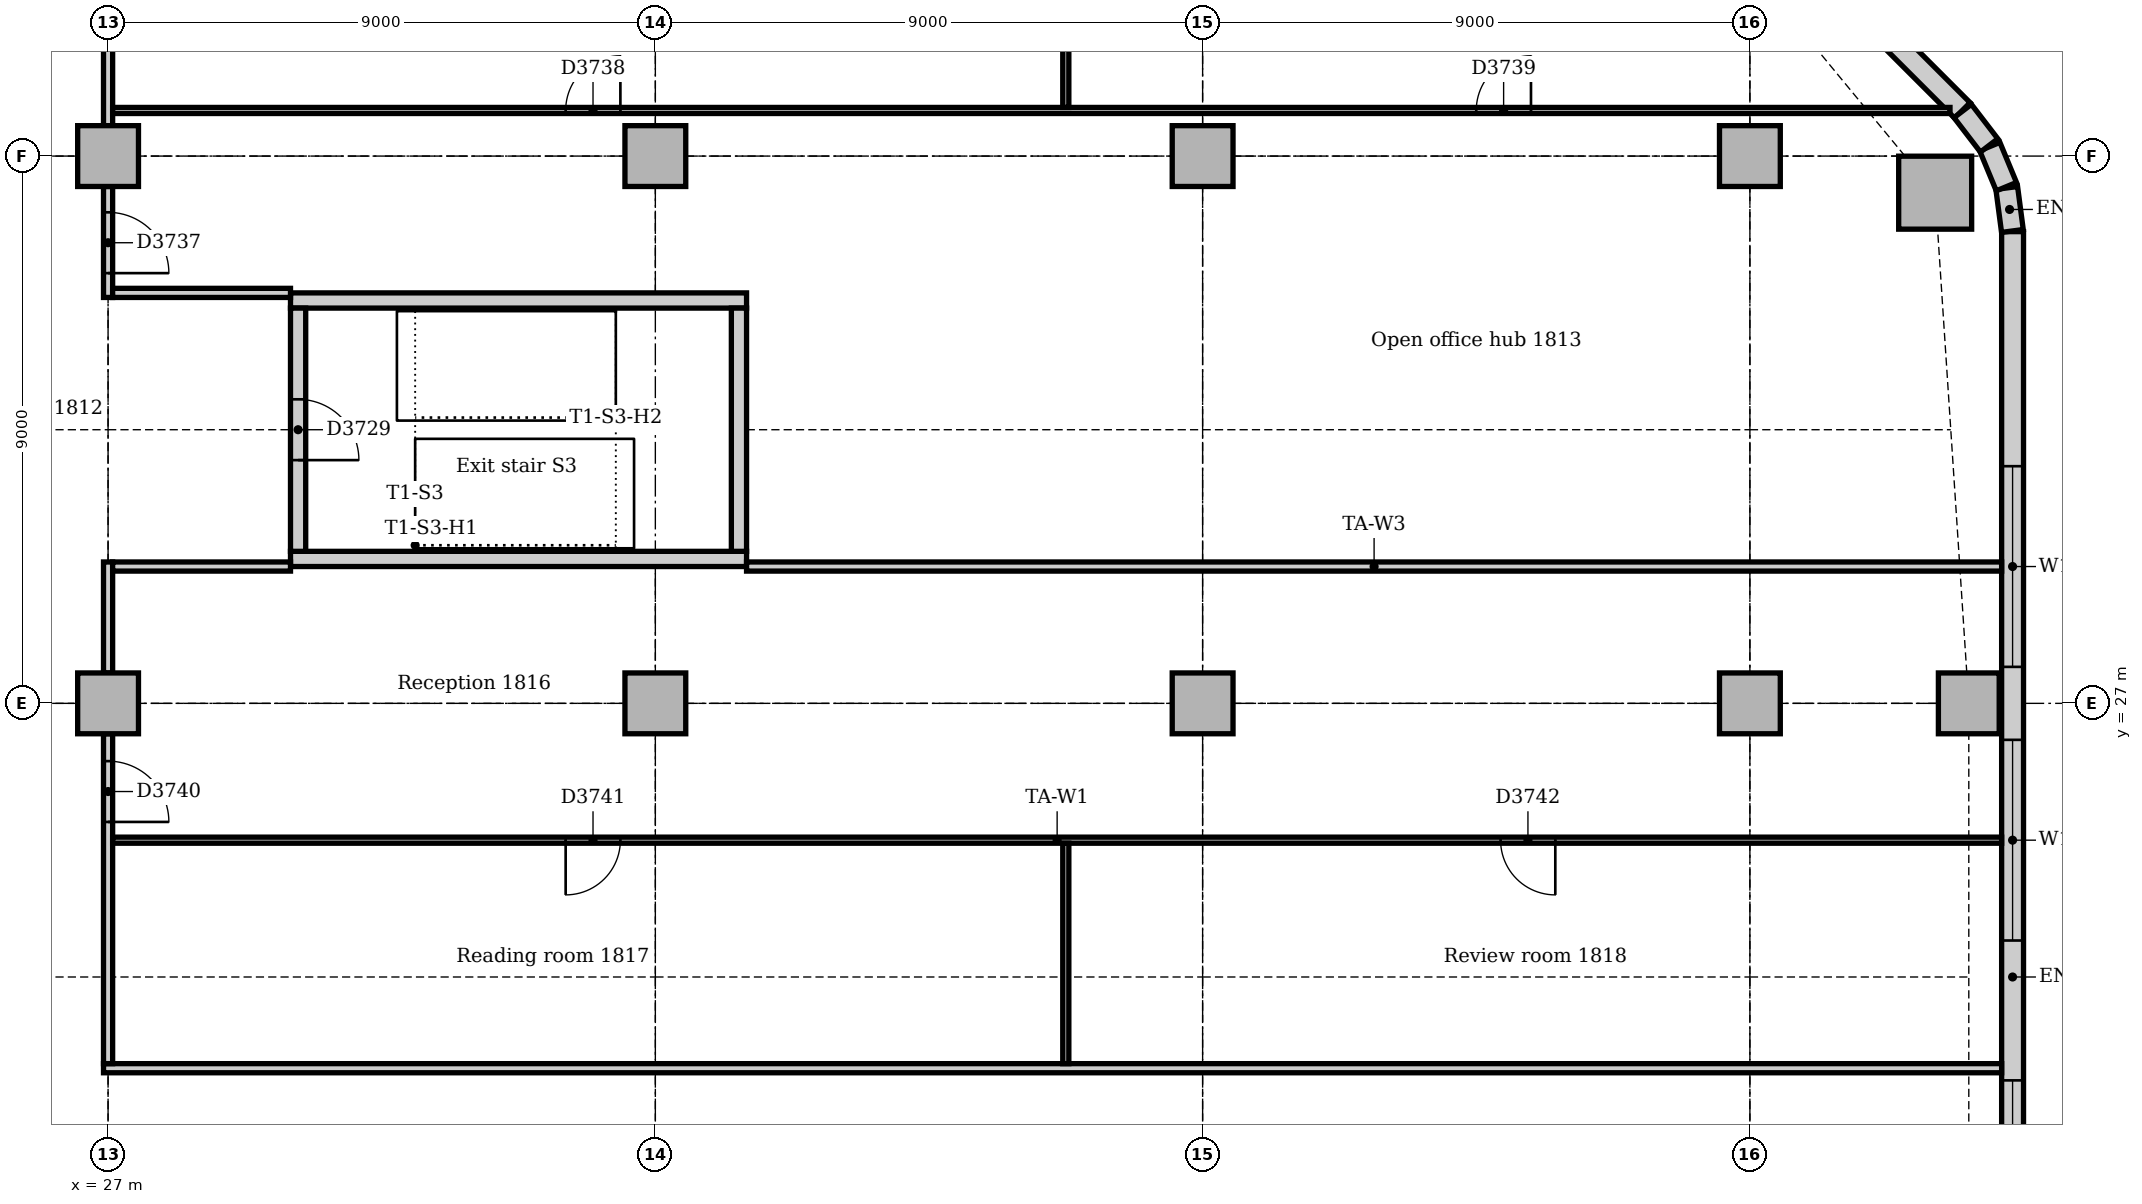
"""IFC4 building model, lengths in metres.
Left out: names, types, materials, properties, quantities, classifications, styles, units other than length and angle.
Written with IfcOpenShell. Run it as: python <this file> out.ifc"""

import sys

from ifc_helpers import new_model, si_unit, direction, frame, frame_2d, origin, origin_2d, place, context, subcontext, project, spatial, rectangle, extrude, element, fill, save


model = new_model("IFC4")
c1 = context("Model", 3, precision=1e-05, world=origin(), true_north=direction((0.0, 1.0)))
c2 = subcontext(c1, "Body", "Model", "MODEL_VIEW")
j1 = project(units=[si_unit("LENGTHUNIT", "METRE"), si_unit("PLANEANGLEUNIT", "RADIAN")], contexts=[c1])
p1 = place(None, origin())
s1 = spatial("IfcSite", under=j1, at=p1, CompositionType="ELEMENT")
p2 = place(p1, origin())
s2 = spatial("IfcBuilding", under=s1, at=p2, CompositionType="ELEMENT")
p3 = place(p2, frame((0.0, 0.0, 79.0)))
s3 = spatial("IfcBuildingStorey", under=s2, at=p3, CompositionType="ELEMENT", Elevation=79.0)
for number, where, z_axis, x_axis in (
    (1, (30.0, 29.375, 0.0), (0.0, 0.0, 1.0), (1.0, 0.0, 0.0)),
    (2, (37.5, 33.625, 0.0), (0.0, 0.0, 1.0), (-1.0, 0.0, 0.0)),
):
    element("IfcWall", number, at=place(p3, frame(where, z_axis=z_axis, x_axis=x_axis)), inside=s3, PredefinedType="SOLIDWALL", context=c2, shape_type="SweptSolid", body=[
        extrude(rectangle(XDim=7.5, YDim=0.25, at=frame_2d((3.75, 0.0))), origin(), (0.0, 0.0, 1.0), 4.0),
    ])
p4 = place(p3, frame((37.375, 29.5, 0.0), z_axis=(0.0, 0.0, 1.0), x_axis=(0.0, 1.0, 0.0)))
e3 = element("IfcWall", 3, at=p4, inside=s3, PredefinedType="SOLIDWALL", context=c2, shape_type="SweptSolid", body=[
    extrude(rectangle(XDim=4.0, YDim=0.25, at=frame_2d((2.0, 0.0))), origin(), (0.0, 0.0, 1.0), 4.0),
])
p5 = place(p3, frame((30.125, 33.5, 0.0), z_axis=(0.0, 0.0, 1.0), x_axis=(0.0, -1.0, 0.0)))
e4 = element("IfcWall", 4, at=p5, inside=s3, PredefinedType="SOLIDWALL", context=c2, shape_type="SweptSolid", body=[
    extrude(rectangle(XDim=4.0, YDim=0.25, at=frame_2d((2.0, 0.0))), origin(), (0.0, 0.0, 1.0), 4.0),
])
p6 = place(p5, frame((1.5, 0.0, 0.0)))
e5 = element("IfcOpeningElement", 5, at=p6, cuts=e4, PredefinedType="OPENING", context=c2, shape_type="SweptSolid", body=[
    extrude(rectangle(XDim=1.0, YDim=2.1, at=frame_2d((0.5, 1.05))), frame((0.0, 0.135, 0.0), z_axis=(0.0, -1.0, 0.0), x_axis=(1.0, 0.0, 0.0)), (0.0, 0.0, 1.0), 0.27),
])
p7 = place(p3, frame((57.047, 35.398, 0.0), z_axis=(0.0, 0.0, 1.0), x_axis=(1.0, 0.0, 0.0)))
e6 = element("IfcColumn", 6, at=p7, inside=s3, PredefinedType="COLUMN", context=c2, shape_type="SweptSolid", body=[
    extrude(rectangle(XDim=1.2, YDim=1.2, at=origin_2d()), origin(), (0.0, 0.0, 1.0), 3.85),
])
for number, where, z_axis, x_axis in (
    (7, (57.6, 27.0, 0.0), (0.0, 0.0, 1.0), (1.0, 0.0, 0.0)),
    (8, (27.0, 27.0, 0.0), (0.0, 0.0, 1.0), (1.0, 0.0, 0.0)),
    (9, (27.0, 36.0, 0.0), (0.0, 0.0, 1.0), (1.0, 0.0, 0.0)),
    (10, (36.0, 27.0, 0.0), (0.0, 0.0, 1.0), (1.0, 0.0, 0.0)),
    (11, (36.0, 36.0, 0.0), (0.0, 0.0, 1.0), (1.0, 0.0, 0.0)),
    (12, (45.0, 27.0, 0.0), (0.0, 0.0, 1.0), (1.0, 0.0, 0.0)),
    (13, (45.0, 36.0, 0.0), (0.0, 0.0, 1.0), (1.0, 0.0, 0.0)),
    (14, (54.0, 27.0, 0.0), (0.0, 0.0, 1.0), (1.0, 0.0, 0.0)),
    (15, (54.0, 36.0, 0.0), (0.0, 0.0, 1.0), (1.0, 0.0, 0.0)),
):
    element("IfcColumn", number, at=place(p3, frame(where, z_axis=z_axis, x_axis=x_axis)), inside=s3, PredefinedType="COLUMN", context=c2, shape_type="SweptSolid", body=[
        extrude(rectangle(XDim=1.0, YDim=1.0, at=origin_2d()), origin(), (0.0, 0.0, 1.0), 3.85),
    ])
p8 = place(p3, frame((58.32, 10.243, 0.0), z_axis=(0.0, 0.0, 1.0), x_axis=(0.0, 1.0, 0.0)))
e16 = element("IfcWall", 16, at=p8, inside=s3, PredefinedType="STANDARD", context=c2, shape_type="SweptSolid", body=[
    extrude(rectangle(XDim=24.515, YDim=0.36, at=frame_2d((12.257, 0.0))), origin(), (0.0, 0.0, 1.0), 3.85),
])
p9 = place(p8, frame((4.907, 0.0, 0.9)))
e17 = element("IfcOpeningElement", 17, at=p9, cuts=e16, PredefinedType="OPENING", context=c2, shape_type="SweptSolid", body=[
    extrude(rectangle(XDim=1.8, YDim=1.6, at=frame_2d((0.9, 0.8))), frame((0.0, 0.19, 0.0), z_axis=(0.0, -1.0, 0.0), x_axis=(1.0, 0.0, 0.0)), (0.0, 0.0, 1.0), 0.38),
])
p10 = place(p8, frame((8.757, 0.0, 0.9)))
e18 = element("IfcOpeningElement", 18, at=p10, cuts=e16, PredefinedType="OPENING", context=c2, shape_type="SweptSolid", body=[
    extrude(rectangle(XDim=1.8, YDim=1.6, at=frame_2d((0.9, 0.8))), frame((0.0, 0.19, 0.0), z_axis=(0.0, -1.0, 0.0), x_axis=(1.0, 0.0, 0.0)), (0.0, 0.0, 1.0), 0.38),
])
p11 = place(p8, frame((12.857, 0.0, 0.9)))
e19 = element("IfcOpeningElement", 19, at=p11, cuts=e16, PredefinedType="OPENING", context=c2, shape_type="SweptSolid", body=[
    extrude(rectangle(XDim=3.3, YDim=1.6, at=frame_2d((1.65, 0.8))), frame((0.0, 0.19, 0.0), z_axis=(0.0, -1.0, 0.0), x_axis=(1.0, 0.0, 0.0)), (0.0, 0.0, 1.0), 0.38),
])
p12 = place(p8, frame((17.357, 0.0, 0.9)))
e20 = element("IfcOpeningElement", 20, at=p12, cuts=e16, PredefinedType="OPENING", context=c2, shape_type="SweptSolid", body=[
    extrude(rectangle(XDim=3.3, YDim=1.6, at=frame_2d((1.65, 0.8))), frame((0.0, 0.19, 0.0), z_axis=(0.0, -1.0, 0.0), x_axis=(1.0, 0.0, 0.0)), (0.0, 0.0, 1.0), 0.38),
])
p13 = place(p3, frame((57.494, 36.751, 0.0), z_axis=(0.0, 0.0, 1.0), x_axis=(-0.707106781187, 0.707106781187, 0.0)))
e21 = element("IfcWall", 21, at=p13, inside=s3, PredefinedType="STANDARD", context=c2, shape_type="SweptSolid", body=[
    extrude(rectangle(XDim=10.243, YDim=0.36, at=frame_2d((5.121, 0.0))), origin(), (0.0, 0.0, 1.0), 3.85),
])
p14 = place(p13, frame((3.471, 0.0, 0.9)))
e22 = element("IfcOpeningElement", 22, at=p14, cuts=e21, PredefinedType="OPENING", context=c2, shape_type="SweptSolid", body=[
    extrude(rectangle(XDim=3.3, YDim=1.6, at=frame_2d((1.65, 0.8))), frame((0.0, 0.19, 0.0), z_axis=(0.0, -1.0, 0.0), x_axis=(1.0, 0.0, 0.0)), (0.0, 0.0, 1.0), 0.38),
])
for number, where, z_axis, x_axis in (
    (23, (58.317, 34.769, 0.0), (0.0, 0.0, 1.0), (-0.131, 0.991, 0.0)),
    (24, (58.218, 35.497, 0.0), (0.0, 0.0, 1.0), (-0.383, 0.924, 0.0)),
):
    element("IfcWall", number, at=place(p3, frame(where, z_axis=z_axis, x_axis=x_axis)), inside=s3, PredefinedType="STANDARD", context=c2, shape_type="SweptSolid", body=[
        extrude(rectangle(XDim=0.713, YDim=0.36, at=frame_2d((0.356, 0.0))), origin(), (0.0, 0.0, 1.0), 3.85),
    ])
p15 = place(p3, frame((57.934, 36.175, 0.0), z_axis=(0.0, 0.0, 1.0), x_axis=(-0.608802368033, 0.793321924995, 0.0)))
e25 = element("IfcWall", 25, at=p15, inside=s3, PredefinedType="STANDARD", context=c2, shape_type="SweptSolid", body=[
    extrude(rectangle(XDim=0.713, YDim=0.36, at=frame_2d((0.357, 0.0))), origin(), (0.0, 0.0, 1.0), 3.85),
])
p16 = place(p3, frame((26.925, 21.0, 0.0), z_axis=(0.0, 0.0, 1.0), x_axis=(1.0, 0.0, 0.0)))
e26 = element("IfcWall", 26, at=p16, inside=s3, PredefinedType="PARTITIONING", context=c2, shape_type="SweptSolid", body=[
    extrude(rectangle(XDim=31.215, YDim=0.15, at=frame_2d((15.607, 0.0))), origin(), (0.0, 0.0, 1.0), 3.85),
])
p17 = place(p3, frame((27.0, 33.675, 0.0), z_axis=(0.0, 0.0, 1.0), x_axis=(0.0, 1.0, 0.0)))
e27 = element("IfcWall", 27, at=p17, inside=s3, PredefinedType="PARTITIONING", context=c2, shape_type="SweptSolid", body=[
    extrude(rectangle(XDim=1.825, YDim=0.15, at=frame_2d((0.912, 0.0))), origin(), (0.0, 0.0, 1.0), 3.158),
])
p18 = place(p17, frame((0.4, 0.0, 0.0)))
e28 = element("IfcOpeningElement", 28, at=p18, cuts=e27, PredefinedType="OPENING", context=c2, shape_type="SweptSolid", body=[
    extrude(rectangle(XDim=1.0, YDim=2.1, at=frame_2d((0.5, 1.05))), frame((0.0, 0.085, 0.0), z_axis=(0.0, -1.0, 0.0), x_axis=(1.0, 0.0, 0.0)), (0.0, 0.0, 1.0), 0.17),
])
p19 = place(p3, frame((27.0, 36.5, 0.0), z_axis=(0.0, 0.0, 1.0), x_axis=(0.0, 1.0, 0.0)))
e29 = element("IfcWall", 29, at=p19, inside=s3, PredefinedType="PARTITIONING", context=c2, shape_type="SweptSolid", body=[
    extrude(rectangle(XDim=7.1, YDim=0.15, at=frame_2d((3.55, 0.0))), origin(), (0.0, 0.0, 1.0), 3.158),
])
p20 = place(p3, frame((27.0, 21.075, 0.0), z_axis=(0.0, 0.0, 1.0), x_axis=(0.0, 1.0, 0.0)))
e30 = element("IfcWall", 30, at=p20, inside=s3, PredefinedType="PARTITIONING", context=c2, shape_type="SweptSolid", body=[
    extrude(rectangle(XDim=5.425, YDim=0.15, at=frame_2d((2.712, 0.0))), origin(), (0.0, 0.0, 1.0), 3.158),
])
p21 = place(p20, frame((3.975, 0.0, 0.0)))
e31 = element("IfcOpeningElement", 31, at=p21, cuts=e30, PredefinedType="OPENING", context=c2, shape_type="SweptSolid", body=[
    extrude(rectangle(XDim=1.0, YDim=2.1, at=frame_2d((0.5, 1.05))), frame((0.0, 0.085, 0.0), z_axis=(0.0, -1.0, 0.0), x_axis=(1.0, 0.0, 0.0)), (0.0, 0.0, 1.0), 0.17),
])
p22 = place(p3, frame((27.0, 27.5, 0.0), z_axis=(0.0, 0.0, 1.0), x_axis=(0.0, 1.0, 0.0)))
e32 = element("IfcWall", 32, at=p22, inside=s3, PredefinedType="PARTITIONING", context=c2, shape_type="SweptSolid", body=[
    extrude(rectangle(XDim=1.825, YDim=0.15, at=frame_2d((0.912, 0.0))), origin(), (0.0, 0.0, 1.0), 3.158),
])
for number, where, z_axis, x_axis in (
    (33, (27.075, 29.25, 0.0), (0.0, 0.0, 1.0), (1.0, 0.0, 0.0)),
    (34, (27.075, 33.75, 0.0), (0.0, 0.0, 1.0), (1.0, 0.0, 0.0)),
):
    element("IfcWall", number, at=place(p3, frame(where, z_axis=z_axis, x_axis=x_axis)), inside=s3, PredefinedType="PARTITIONING", context=c2, shape_type="SweptSolid", body=[
        extrude(rectangle(XDim=2.925, YDim=0.15, at=frame_2d((1.462, 0.0))), origin(), (0.0, 0.0, 1.0), 3.85),
    ])
p23 = place(p3, frame((37.5, 29.25, 0.0), z_axis=(0.0, 0.0, 1.0), x_axis=(1.0, 0.0, 0.0)))
e35 = element("IfcWall", 35, at=p23, inside=s3, PredefinedType="PARTITIONING", context=c2, shape_type="SweptSolid", body=[
    extrude(rectangle(XDim=20.64, YDim=0.15, at=frame_2d((10.32, 0.0))), origin(), (0.0, 0.0, 1.0), 3.85),
])
p24 = place(p3, frame((27.075, 24.75, 0.0), z_axis=(0.0, 0.0, 1.0), x_axis=(1.0, 0.0, 0.0)))
e36 = element("IfcWall", 36, at=p24, inside=s3, PredefinedType="PARTITIONING", context=c2, shape_type="SweptSolid", body=[
    extrude(rectangle(XDim=31.065, YDim=0.1, at=frame_2d((15.533, 0.0))), origin(), (0.0, 0.0, 1.0), 3.85),
])
p25 = place(p24, frame((7.45, 0.0, 0.0)))
e37 = element("IfcOpeningElement", 37, at=p25, cuts=e36, PredefinedType="OPENING", context=c2, shape_type="SweptSolid", body=[
    extrude(rectangle(XDim=0.9, YDim=2.1, at=frame_2d((0.45, 1.05))), frame((0.0, 0.06, 0.0), z_axis=(0.0, -1.0, 0.0), x_axis=(1.0, 0.0, 0.0)), (0.0, 0.0, 1.0), 0.12),
])
p26 = place(p24, frame((22.825, 0.0, 0.0)))
e38 = element("IfcOpeningElement", 38, at=p26, cuts=e36, PredefinedType="OPENING", context=c2, shape_type="SweptSolid", body=[
    extrude(rectangle(XDim=0.9, YDim=2.1, at=frame_2d((0.45, 1.05))), frame((0.0, 0.06, 0.0), z_axis=(0.0, -1.0, 0.0), x_axis=(1.0, 0.0, 0.0)), (0.0, 0.0, 1.0), 0.12),
])
p27 = place(p3, frame((27.075, 36.75, 0.0), z_axis=(0.0, 0.0, 1.0), x_axis=(1.0, 0.0, 0.0)))
e39 = element("IfcWall", 39, at=p27, inside=s3, PredefinedType="PARTITIONING", context=c2, shape_type="SweptSolid", body=[
    extrude(rectangle(XDim=30.216, YDim=0.1, at=frame_2d((15.108, 0.0))), origin(), (0.0, 0.0, 1.0), 3.85),
])
p28 = place(p27, frame((7.45, 0.0, 0.0)))
e40 = element("IfcOpeningElement", 40, at=p28, cuts=e39, PredefinedType="OPENING", context=c2, shape_type="SweptSolid", body=[
    extrude(rectangle(XDim=0.9, YDim=2.1, at=frame_2d((0.45, 1.05))), frame((0.0, 0.06, 0.0), z_axis=(0.0, -1.0, 0.0), x_axis=(1.0, 0.0, 0.0)), (0.0, 0.0, 1.0), 0.12),
])
p29 = place(p27, frame((22.425, 0.0, 0.0)))
e41 = element("IfcOpeningElement", 41, at=p29, cuts=e39, PredefinedType="OPENING", context=c2, shape_type="SweptSolid", body=[
    extrude(rectangle(XDim=0.9, YDim=2.1, at=frame_2d((0.45, 1.05))), frame((0.0, 0.06, 0.0), z_axis=(0.0, -1.0, 0.0), x_axis=(1.0, 0.0, 0.0)), (0.0, 0.0, 1.0), 0.12),
])
p30 = place(p3, frame((42.75, 36.8, 0.0), z_axis=(0.0, 0.0, 1.0), x_axis=(0.0, 1.0, 0.0)))
e42 = element("IfcWall", 42, at=p30, inside=s3, PredefinedType="PARTITIONING", context=c2, shape_type="SweptSolid", body=[
    extrude(rectangle(XDim=7.84, YDim=0.1, at=frame_2d((3.92, 0.0))), origin(), (0.0, 0.0, 1.0), 3.85),
])
p31 = place(p3, frame((42.75, 21.075, 0.0), z_axis=(0.0, 0.0, 1.0), x_axis=(0.0, 1.0, 0.0)))
e43 = element("IfcWall", 43, at=p31, inside=s3, PredefinedType="PARTITIONING", context=c2, shape_type="SweptSolid", body=[
    extrude(rectangle(XDim=3.625, YDim=0.1, at=frame_2d((1.812, 0.0))), origin(), (0.0, 0.0, 1.0), 3.85),
])
p32 = place(p10, origin())
e44 = element("IfcWindow", 44, at=p32, inside=s3, PartitioningType="SINGLE_PANEL", PredefinedType="WINDOW", context=c2, shape_type="SweptSolid", body=[
    extrude(rectangle(XDim=1.8, YDim=1.6, at=frame_2d((0.9, 0.8))), frame((0.0, 0.13, 0.0), z_axis=(0.0, -1.0, 0.0), x_axis=(1.0, 0.0, 0.0)), (0.0, 0.0, 1.0), 0.06),
])
fill(e18, e44)
p33 = place(p11, origin())
e45 = element("IfcWindow", 45, at=p33, inside=s3, PartitioningType="SINGLE_PANEL", PredefinedType="WINDOW", context=c2, shape_type="SweptSolid", body=[
    extrude(rectangle(XDim=3.3, YDim=1.6, at=frame_2d((1.65, 0.8))), frame((0.0, 0.13, 0.0), z_axis=(0.0, -1.0, 0.0), x_axis=(1.0, 0.0, 0.0)), (0.0, 0.0, 1.0), 0.06),
])
fill(e19, e45)
p34 = place(p12, origin())
e46 = element("IfcWindow", 46, at=p34, inside=s3, PartitioningType="SINGLE_PANEL", PredefinedType="WINDOW", context=c2, shape_type="SweptSolid", body=[
    extrude(rectangle(XDim=3.3, YDim=1.6, at=frame_2d((1.65, 0.8))), frame((0.0, 0.13, 0.0), z_axis=(0.0, -1.0, 0.0), x_axis=(1.0, 0.0, 0.0)), (0.0, 0.0, 1.0), 0.06),
])
fill(e20, e46)
p35 = place(p6, origin())
e47 = element("IfcDoor", 47, at=p35, inside=s3, OperationType="SINGLE_SWING_RIGHT", PredefinedType="DOOR", context=c2, shape_type="SweptSolid", body=[
    extrude(rectangle(XDim=1.0, YDim=2.1, at=frame_2d((0.5, 1.05))), frame((0.0, 0.025, 0.0), z_axis=(0.0, -1.0, 0.0), x_axis=(1.0, 0.0, 0.0)), (0.0, 0.0, 1.0), 0.05),
])
fill(e5, e47)
p36 = place(p18, frame((1.0, 0.0, 0.0), z_axis=(0.0, 0.0, 1.0), x_axis=(-1.0, 0.0, 0.0)))
e48 = element("IfcDoor", 48, at=p36, inside=s3, OperationType="SINGLE_SWING_RIGHT", PredefinedType="DOOR", context=c2, shape_type="SweptSolid", body=[
    extrude(rectangle(XDim=1.0, YDim=2.1, at=frame_2d((0.5, 1.05))), frame((0.0, 0.025, 0.0), z_axis=(0.0, -1.0, 0.0), x_axis=(1.0, 0.0, 0.0)), (0.0, 0.0, 1.0), 0.05),
])
fill(e28, e48)
p37 = place(p28, origin())
e49 = element("IfcDoor", 49, at=p37, inside=s3, OperationType="SINGLE_SWING_RIGHT", PredefinedType="DOOR", context=c2, shape_type="SweptSolid", body=[
    extrude(rectangle(XDim=0.9, YDim=2.1, at=frame_2d((0.45, 1.05))), frame((0.0, 0.025, 0.0), z_axis=(0.0, -1.0, 0.0), x_axis=(1.0, 0.0, 0.0)), (0.0, 0.0, 1.0), 0.05),
])
fill(e40, e49)
p38 = place(p29, origin())
e50 = element("IfcDoor", 50, at=p38, inside=s3, OperationType="SINGLE_SWING_RIGHT", PredefinedType="DOOR", context=c2, shape_type="SweptSolid", body=[
    extrude(rectangle(XDim=0.9, YDim=2.1, at=frame_2d((0.45, 1.05))), frame((0.0, 0.025, 0.0), z_axis=(0.0, -1.0, 0.0), x_axis=(1.0, 0.0, 0.0)), (0.0, 0.0, 1.0), 0.05),
])
fill(e41, e50)
p39 = place(p21, frame((1.0, 0.0, 0.0), z_axis=(0.0, 0.0, 1.0), x_axis=(-1.0, 0.0, 0.0)))
e51 = element("IfcDoor", 51, at=p39, inside=s3, OperationType="SINGLE_SWING_RIGHT", PredefinedType="DOOR", context=c2, shape_type="SweptSolid", body=[
    extrude(rectangle(XDim=1.0, YDim=2.1, at=frame_2d((0.5, 1.05))), frame((0.0, 0.025, 0.0), z_axis=(0.0, -1.0, 0.0), x_axis=(1.0, 0.0, 0.0)), (0.0, 0.0, 1.0), 0.05),
])
fill(e31, e51)
p40 = place(p25, frame((0.9, 0.0, 0.0), z_axis=(0.0, 0.0, 1.0), x_axis=(-1.0, 0.0, 0.0)))
e52 = element("IfcDoor", 52, at=p40, inside=s3, OperationType="SINGLE_SWING_RIGHT", PredefinedType="DOOR", context=c2, shape_type="SweptSolid", body=[
    extrude(rectangle(XDim=0.9, YDim=2.1, at=frame_2d((0.45, 1.05))), frame((0.0, 0.025, 0.0), z_axis=(0.0, -1.0, 0.0), x_axis=(1.0, 0.0, 0.0)), (0.0, 0.0, 1.0), 0.05),
])
fill(e37, e52)
p41 = place(p26, frame((0.9, 0.0, 0.0), z_axis=(0.0, 0.0, 1.0), x_axis=(-1.0, 0.0, 0.0)))
e53 = element("IfcDoor", 53, at=p41, inside=s3, OperationType="SINGLE_SWING_LEFT", PredefinedType="DOOR", context=c2, shape_type="SweptSolid", body=[
    extrude(rectangle(XDim=0.9, YDim=2.1, at=frame_2d((0.45, 1.05))), frame((0.0, 0.025, 0.0), z_axis=(0.0, -1.0, 0.0), x_axis=(1.0, 0.0, 0.0)), (0.0, 0.0, 1.0), 0.05),
])
fill(e38, e53)
save(model, sys.argv[1])
